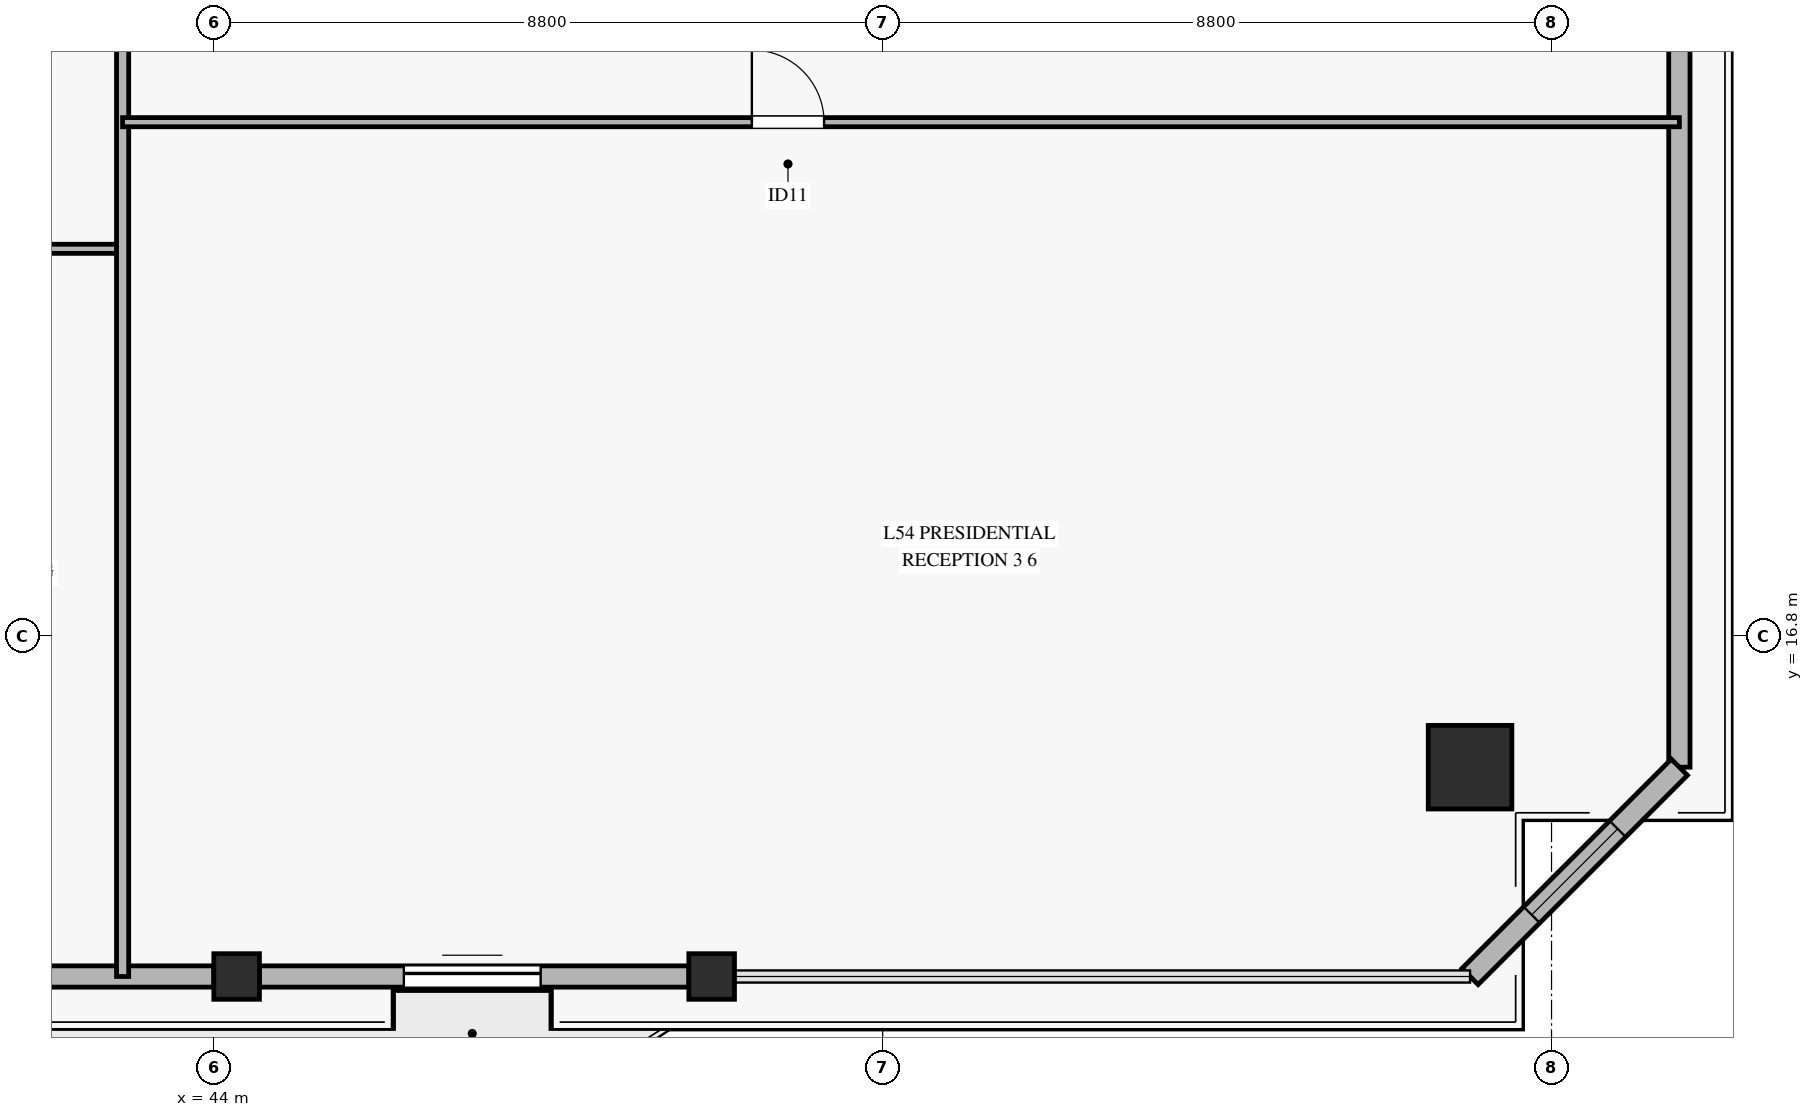
"""IFC4 building model, lengths in metres.
Left out: names, types, materials, properties, quantities, classifications, styles, units other than length and angle.
Written with IfcOpenShell. Run it as: python <this file> out.ifc"""

import sys

from ifc_helpers import new_model, si_unit, direction, frame, frame_2d, origin, origin_2d, place, context, subcontext, project, spatial, rectangle, hollow_rectangle, extrude, source, transform, mapped, element, fill, save


model = new_model("IFC4")
c1 = context("Model", 3, precision=1e-05, world=origin(), true_north=direction((0.0, 1.0)))
c2 = subcontext(c1, "Body", "Model", "MODEL_VIEW")
j1 = project(units=[si_unit("LENGTHUNIT", "METRE"), si_unit("PLANEANGLEUNIT", "RADIAN")], contexts=[c1])
p1 = place(None, origin())
s1 = spatial("IfcSite", under=j1, at=p1, CompositionType="ELEMENT")
p2 = place(p1, origin())
s2 = spatial("IfcBuilding", under=s1, at=p2, CompositionType="ELEMENT")
p3 = place(p2, frame((0.0, 0.0, 213.2)))
s3 = spatial("IfcBuildingStorey", under=s2, at=p3, CompositionType="ELEMENT", Elevation=213.2)
m1 = source(origin(), c2, "Body", "SweptSolid", [
    extrude(hollow_rectangle(XDim=1.1, YDim=1.1, WallThickness=0.05, at=origin_2d()), origin(), (0.0, 0.0, 1.0), 3.27),
])
p4 = place(p3, frame((60.528, 15.072, 0.0), z_axis=(0.0, 0.0, 1.0), x_axis=(1.0, 0.0, 0.0)))
e1 = element("IfcColumn", 1, at=p4, inside=s3, PredefinedType="COLUMN", context=c2, shape_type="MappedRepresentation", body=[
    mapped(m1, transform((0.0, 0.0, 0.0), x_axis=(1.0, 0.0, 0.0), y_axis=(0.0, 1.0, 0.0), z_axis=(0.0, 0.0, 1.0), scale=1.0)),
])
m2 = source(origin(), c2, "Body", "SweptSolid", [
    extrude(hollow_rectangle(XDim=0.6, YDim=0.6, WallThickness=0.028, at=origin_2d()), origin(), (0.0, 0.0, 1.0), 3.27),
])
for number, where, z_axis, x_axis in (
    (2, (44.3, 12.318, 0.0), (0.0, 0.0, 1.0), (1.0, 0.0, 0.0)),
    (3, (50.55, 12.318, 0.0), (0.0, 0.0, 1.0), (1.0, 0.0, 0.0)),
):
    element("IfcColumn", number, at=place(p3, frame(where, z_axis=z_axis, x_axis=x_axis)), inside=s3, PredefinedType="COLUMN", context=c2, shape_type="MappedRepresentation", body=[
        mapped(m2, transform((0.0, 0.0, 0.0), x_axis=(1.0, 0.0, 0.0), y_axis=(0.0, 1.0, 0.0), z_axis=(0.0, 0.0, 1.0), scale=1.0)),
    ])
p5 = place(p3, frame((37.85, 12.318, 0.0), z_axis=(0.0, 0.0, 1.0), x_axis=(1.0, 0.0, 0.0)))
e4 = element("IfcWall", 4, at=p5, inside=s3, PredefinedType="SOLIDWALL", context=c2, shape_type="SweptSolid", body=[
    extrude(rectangle(XDim=6.15, YDim=0.28, at=frame_2d((3.075, 0.0))), origin(), (0.0, 0.0, 1.0), 2.75),
])
p6 = place(p3, frame((44.6, 12.318, 0.0), z_axis=(0.0, 0.0, 1.0), x_axis=(1.0, 0.0, 0.0)))
e5 = element("IfcWall", 5, at=p6, inside=s3, PredefinedType="SOLIDWALL", context=c2, shape_type="SweptSolid", body=[
    extrude(rectangle(XDim=5.65, YDim=0.28, at=frame_2d((2.825, 0.0))), origin(), (0.0, 0.0, 1.0), 2.75),
])
p7 = place(p6, frame((1.9, 0.0, 0.0)))
e6 = element("IfcOpeningElement", 6, at=p7, cuts=e5, PredefinedType="OPENING", context=c2, shape_type="SweptSolid", body=[
    extrude(rectangle(XDim=1.8, YDim=2.25, at=frame_2d((0.9, 1.125))), frame((0.0, 0.15, 0.0), z_axis=(0.0, -1.0, 0.0), x_axis=(1.0, 0.0, 0.0)), (0.0, 0.0, 1.0), 0.3),
])
p8 = place(p3, frame((63.282, 15.072, 0.0), z_axis=(0.0, 0.0, 1.0), x_axis=(0.0, 1.0, 0.0)))
e7 = element("IfcWall", 7, at=p8, inside=s3, PredefinedType="SOLIDWALL", context=c2, shape_type="SweptSolid", body=[
    extrude(rectangle(XDim=13.837, YDim=0.28, at=frame_2d((6.918, 0.0))), origin(), (0.0, 0.0, 1.0), 2.75),
])
p9 = place(p8, frame((9.71, 0.0, 0.45)))
e8 = element("IfcOpeningElement", 8, at=p9, cuts=e7, PredefinedType="OPENING", context=c2, shape_type="SweptSolid", body=[
    extrude(rectangle(XDim=2.0, YDim=2.0, at=frame_2d((1.0, 1.0))), frame((0.0, 0.15, 0.0), z_axis=(0.0, -1.0, 0.0), x_axis=(1.0, 0.0, 0.0)), (0.0, 0.0, 1.0), 0.3),
])
p10 = place(p3, frame((60.528, 12.318, 0.0), z_axis=(0.0, 0.0, 1.0), x_axis=(0.707106781187, 0.707106781187, 0.0)))
e9 = element("IfcWall", 9, at=p10, inside=s3, PredefinedType="SOLIDWALL", context=c2, shape_type="SweptSolid", body=[
    extrude(rectangle(XDim=3.895, YDim=0.3, at=frame_2d((1.947, 0.0))), origin(), (0.0, 0.0, 1.0), 2.75),
])
p11 = place(p10, frame((1.147, 0.0, 0.45)))
e10 = element("IfcOpeningElement", 10, at=p11, cuts=e9, PredefinedType="OPENING", context=c2, shape_type="SweptSolid", body=[
    extrude(rectangle(XDim=1.6, YDim=2.0, at=frame_2d((0.8, 1.0))), frame((0.0, 0.16, 0.0), z_axis=(0.0, -1.0, 0.0), x_axis=(1.0, 0.0, 0.0)), (0.0, 0.0, 1.0), 0.32),
])
p12 = place(p3, frame((37.8, 21.893, 0.0), z_axis=(0.0, 0.0, 1.0), x_axis=(1.0, 0.0, 0.0)))
e11 = element("IfcWall", 11, at=p12, inside=s3, PredefinedType="PARTITIONING", context=c2, shape_type="SweptSolid", body=[
    extrude(rectangle(XDim=5.0, YDim=0.12, at=frame_2d((2.5, 0.0))), origin(), (0.0, 0.0, 1.0), 3.27),
])
p13 = place(p12, frame((2.225, 0.0, 0.0)))
e12 = element("IfcOpeningElement", 12, at=p13, cuts=e11, PredefinedType="OPENING", context=c2, shape_type="SweptSolid", body=[
    extrude(rectangle(XDim=0.95, YDim=2.1, at=frame_2d((0.475, 1.05))), frame((0.0, 0.07, 0.0), z_axis=(0.0, -1.0, 0.0), x_axis=(1.0, 0.0, 0.0)), (0.0, 0.0, 1.0), 0.14),
])
p14 = place(p3, frame((42.8, 12.318, 0.0), z_axis=(0.0, 0.0, 1.0), x_axis=(0.0, 1.0, 0.0)))
e13 = element("IfcWall", 13, at=p14, inside=s3, PredefinedType="PARTITIONING", context=c2, shape_type="SweptSolid", body=[
    extrude(rectangle(XDim=22.282, YDim=0.16, at=frame_2d((11.141, 0.0))), origin(), (0.0, 0.0, 1.0), 2.755),
])
p15 = place(p3, frame((42.8, 23.559, 0.0), z_axis=(0.0, 0.0, 1.0), x_axis=(1.0, 0.0, 0.0)))
e14 = element("IfcWall", 14, at=p15, inside=s3, PredefinedType="PARTITIONING", context=c2, shape_type="SweptSolid", body=[
    extrude(rectangle(XDim=20.482, YDim=0.12, at=frame_2d((10.241, 0.0))), origin(), (0.0, 0.0, 1.0), 2.455),
])
p16 = place(p15, frame((8.279, 0.0, 0.0)))
e15 = element("IfcOpeningElement", 15, at=p16, cuts=e14, PredefinedType="OPENING", context=c2, shape_type="SweptSolid", body=[
    extrude(rectangle(XDim=0.95, YDim=2.1, at=frame_2d((0.475, 1.05))), frame((0.0, 0.07, 0.0), z_axis=(0.0, -1.0, 0.0), x_axis=(1.0, 0.0, 0.0)), (0.0, 0.0, 1.0), 0.14),
])
m3 = source(origin(), c2, "Body", "SweptSolid", [
    extrude(rectangle(XDim=1.8, YDim=2.25, at=frame_2d((0.9, 1.125))), frame((0.0, 0.025, 0.0), z_axis=(0.0, -1.0, 0.0), x_axis=(1.0, 0.0, 0.0)), (0.0, 0.0, 1.0), 0.05),
])
p17 = place(p7, origin())
e16 = element("IfcDoor", 16, at=p17, inside=s3, OperationType="SLIDING_TO_LEFT", PredefinedType="DOOR", context=c2, shape_type="MappedRepresentation", body=[
    mapped(m3, transform((0.0, 0.0, 0.0), x_axis=(1.0, 0.0, 0.0), y_axis=(0.0, 1.0, 0.0), z_axis=(0.0, 0.0, 1.0), scale=1.0)),
])
fill(e6, e16)
m4 = source(origin(), c2, "Body", "SweptSolid", [
    extrude(rectangle(XDim=1.6, YDim=2.0, at=frame_2d((0.8, 1.0))), frame((0.0, 0.03, 0.0), z_axis=(0.0, -1.0, 0.0), x_axis=(1.0, 0.0, 0.0)), (0.0, 0.0, 1.0), 0.06),
])
p18 = place(p11, origin())
e17 = element("IfcWindow", 17, at=p18, inside=s3, PartitioningType="SINGLE_PANEL", PredefinedType="WINDOW", context=c2, shape_type="MappedRepresentation", body=[
    mapped(m4, transform((0.0, 0.0, 0.0), x_axis=(1.0, 0.0, 0.0), y_axis=(0.0, 1.0, 0.0), z_axis=(0.0, 0.0, 1.0), scale=1.0)),
])
fill(e10, e17)
m5 = source(origin(), c2, "Body", "SweptSolid", [
    extrude(rectangle(XDim=0.95, YDim=2.1, at=frame_2d((0.475, 1.05))), frame((0.0, 0.025, 0.0), z_axis=(0.0, -1.0, 0.0), x_axis=(1.0, 0.0, 0.0)), (0.0, 0.0, 1.0), 0.05),
])
p19 = place(p16, origin())
e18 = element("IfcDoor", 18, at=p19, inside=s3, OperationType="SINGLE_SWING_LEFT", PredefinedType="DOOR", context=c2, shape_type="MappedRepresentation", body=[
    mapped(m5, transform((0.0, 0.0, 0.0), x_axis=(1.0, 0.0, 0.0), y_axis=(0.0, 1.0, 0.0), z_axis=(0.0, 0.0, 1.0), scale=1.0)),
])
fill(e15, e18)
save(model, sys.argv[1])
